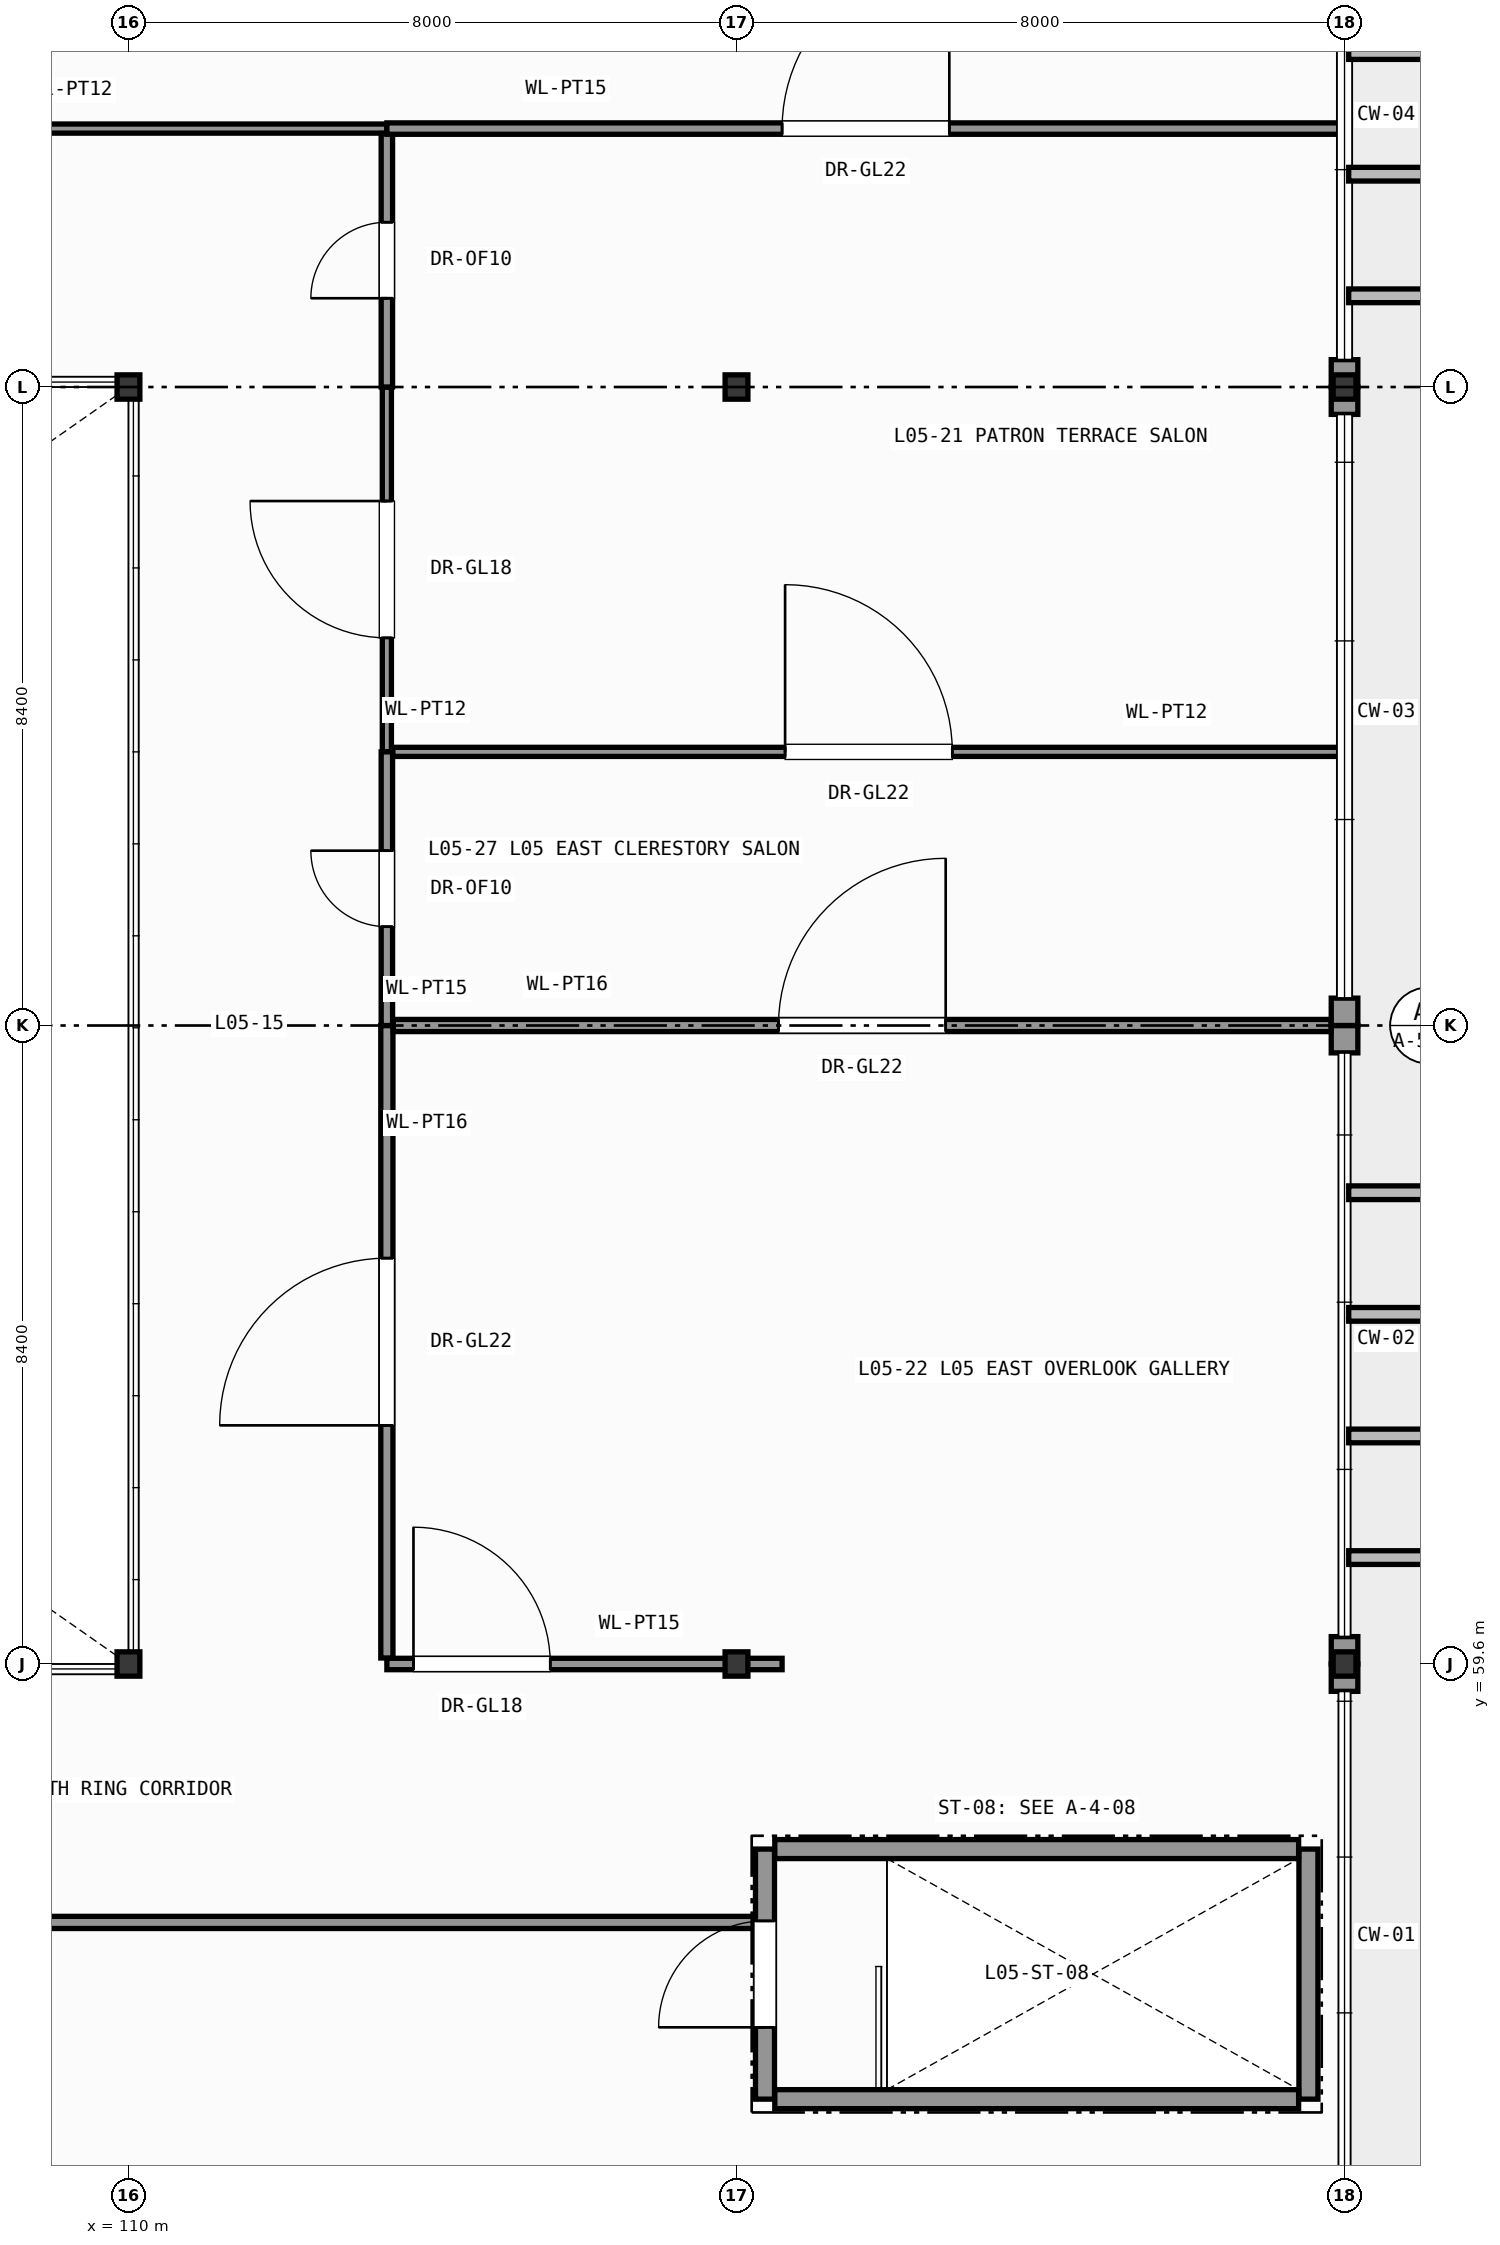
"""IFC4 building model, lengths in metres.
Left out: names, types, materials, properties, quantities, classifications, styles, units other than length and angle.
Written with IfcOpenShell. Run it as: python <this file> out.ifc"""

import sys

from ifc_helpers import new_model, si_unit, direction, frame, frame_2d, origin, origin_2d, place, context, subcontext, project, spatial, rectangle, i_section, extrude, element, fill, save


model = new_model("IFC4")
c1 = context("Model", 3, precision=1e-05, world=origin(), true_north=direction((0.0, 1.0)))
c2 = subcontext(c1, "Body", "Model", "MODEL_VIEW")
j1 = project(units=[si_unit("LENGTHUNIT", "METRE"), si_unit("PLANEANGLEUNIT", "RADIAN")], contexts=[c1])
p1 = place(None, origin())
s1 = spatial("IfcSite", under=j1, at=p1, CompositionType="ELEMENT")
p2 = place(p1, origin())
s2 = spatial("IfcBuilding", under=s1, at=p2, CompositionType="ELEMENT")
p3 = place(p2, frame((0.0, 0.0, 22.2)))
s3 = spatial("IfcBuildingStorey", under=s2, at=p3, CompositionType="ELEMENT", Elevation=22.2)
for number, where, z_axis, x_axis in (
    (1, (110.0, 59.6, 0.0), (0.0, 0.0, 1.0), (1.0, 0.0, 0.0)),
    (2, (110.0, 76.4, 0.0), (0.0, 0.0, 1.0), (1.0, 0.0, 0.0)),
    (3, (118.0, 59.6, 0.0), (0.0, 0.0, 1.0), (1.0, 0.0, 0.0)),
    (4, (118.0, 76.4, 0.0), (0.0, 0.0, 1.0), (1.0, 0.0, 0.0)),
    (5, (126.0, 59.6, 0.0), (0.0, 0.0, 1.0), (1.0, 0.0, 0.0)),
    (6, (126.0, 76.4, 0.0), (0.0, 0.0, 1.0), (1.0, 0.0, 0.0)),
):
    element("IfcColumn", number, at=place(p3, frame(where, z_axis=z_axis, x_axis=x_axis)), inside=s3, PredefinedType="COLUMN", context=c2, shape_type="SweptSolid", body=[
        extrude(i_section(OverallWidth=0.3, OverallDepth=0.32, WebThickness=0.011, FlangeThickness=0.021, FilletRadius=0.027, at=origin_2d()), origin(), (0.0, 0.0, 1.0), 4.2),
    ])
p4 = place(p3, frame((126.0, 59.24, 0.0), z_axis=(0.0, 0.0, 1.0), x_axis=(0.0, 1.0, 0.0)))
e7 = element("IfcWall", 7, at=p4, inside=s3, PredefinedType="SOLIDWALL", context=c2, shape_type="SweptSolid", body=[
    extrude(rectangle(XDim=0.36, YDim=0.35, at=frame_2d((0.18, 0.0))), origin(), (0.0, 0.0, 1.0), 3.98),
])
p5 = place(p3, frame((126.0, 59.6, 0.0), z_axis=(0.0, 0.0, 1.0), x_axis=(0.0, 1.0, 0.0)))
e8 = element("IfcWall", 8, at=p5, inside=s3, PredefinedType="SOLIDWALL", context=c2, shape_type="SweptSolid", body=[
    extrude(rectangle(XDim=0.36, YDim=0.35, at=frame_2d((0.18, 0.0))), origin(), (0.0, 0.0, 1.0), 3.98),
])
for number, where, z_axis, x_axis in (
    (9, (126.0, 67.64, 0.0), (0.0, 0.0, 1.0), (0.0, 1.0, 0.0)),
    (10, (126.0, 68.0, 0.0), (0.0, 0.0, 1.0), (0.0, 1.0, 0.0)),
):
    element("IfcWall", number, at=place(p3, frame(where, z_axis=z_axis, x_axis=x_axis)), inside=s3, PredefinedType="SOLIDWALL", context=c2, shape_type="SweptSolid", body=[
        extrude(rectangle(XDim=0.36, YDim=0.35, at=frame_2d((0.18, 0.0))), origin(), (0.0, 0.0, 1.0), 3.98),
    ])
p6 = place(p3, frame((126.0, 76.04, 0.0), z_axis=(0.0, 0.0, 1.0), x_axis=(0.0, 1.0, 0.0)))
e11 = element("IfcWall", 11, at=p6, inside=s3, PredefinedType="SOLIDWALL", context=c2, shape_type="SweptSolid", body=[
    extrude(rectangle(XDim=0.36, YDim=0.35, at=frame_2d((0.18, 0.0))), origin(), (0.0, 0.0, 1.0), 3.98),
])
p7 = place(p3, frame((126.0, 76.4, 0.0), z_axis=(0.0, 0.0, 1.0), x_axis=(0.0, 1.0, 0.0)))
e12 = element("IfcWall", 12, at=p7, inside=s3, PredefinedType="SOLIDWALL", context=c2, shape_type="SweptSolid", body=[
    extrude(rectangle(XDim=0.36, YDim=0.35, at=frame_2d((0.18, 0.0))), origin(), (0.0, 0.0, 1.0), 3.98),
])
p8 = place(p3, frame((118.375, 53.875, 0.0), z_axis=(0.0, 0.0, 1.0), x_axis=(0.0, 1.0, 0.0)))
e13 = element("IfcWall", 13, at=p8, inside=s3, PredefinedType="SHEAR", context=c2, shape_type="SweptSolid", body=[
    extrude(rectangle(XDim=3.29, YDim=0.25, at=frame_2d((1.645, 0.0))), origin(), (0.0, 0.0, 1.0), 3.98),
])
p9 = place(p8, frame((0.945, 0.0, 0.0)))
e14 = element("IfcOpeningElement", 14, at=p9, cuts=e13, PredefinedType="OPENING", context=c2, shape_type="SweptSolid", body=[
    extrude(rectangle(XDim=1.4, YDim=2.2, at=frame_2d((0.7, 1.1))), frame((0.0, 0.135, 0.0), z_axis=(0.0, -1.0, 0.0), x_axis=(1.0, 0.0, 0.0)), (0.0, 0.0, 1.0), 0.27),
])
p10 = place(p3, frame((125.525, 53.875, 0.0), z_axis=(0.0, 0.0, 1.0), x_axis=(0.0, 1.0, 0.0)))
e15 = element("IfcWall", 15, at=p10, inside=s3, PredefinedType="SHEAR", context=c2, shape_type="SweptSolid", body=[
    extrude(rectangle(XDim=3.29, YDim=0.25, at=frame_2d((1.645, 0.0))), origin(), (0.0, 0.0, 1.0), 3.98),
])
for number, where, z_axis, x_axis in (
    (16, (118.504, 53.875, 0.0), (0.0, 0.0, 1.0), (1.0, 0.0, 0.0)),
    (17, (118.504, 57.165, 0.0), (0.0, 0.0, 1.0), (1.0, 0.0, 0.0)),
):
    element("IfcWall", number, at=place(p3, frame(where, z_axis=z_axis, x_axis=x_axis)), inside=s3, PredefinedType="SHEAR", context=c2, shape_type="SweptSolid", body=[
        extrude(rectangle(XDim=6.892, YDim=0.25, at=frame_2d((3.446, 0.0))), origin(), (0.0, 0.0, 1.0), 3.98),
    ])
p11 = place(p3, frame((82.6, 56.2, 0.0), z_axis=(0.0, 0.0, 1.0), x_axis=(1.0, 0.0, 0.0)))
e18 = element("IfcWall", 18, at=p11, inside=s3, PredefinedType="PARTITIONING", context=c2, shape_type="SweptSolid", body=[
    extrude(rectangle(XDim=35.646, YDim=0.16, at=frame_2d((17.823, 0.0))), origin(), (0.0, 0.0, 1.0), 3.98),
])
p12 = place(p11, frame((16.723, 0.0, 0.0)))
e19 = element("IfcOpeningElement", 19, at=p12, cuts=e18, PredefinedType="OPENING", context=c2, shape_type="SweptSolid", body=[
    extrude(rectangle(XDim=2.2, YDim=2.6, at=frame_2d((1.1, 1.3))), frame((0.0, 0.09, 0.0), z_axis=(0.0, -1.0, 0.0), x_axis=(1.0, 0.0, 0.0)), (0.0, 0.0, 1.0), 0.18),
])
p13 = place(p3, frame((113.4, 59.6, 0.0), z_axis=(0.0, 0.0, 1.0), x_axis=(1.0, 0.0, 0.0)))
e20 = element("IfcWall", 20, at=p13, inside=s3, PredefinedType="PARTITIONING", context=c2, shape_type="SweptSolid", body=[
    extrude(rectangle(XDim=5.2, YDim=0.15, at=frame_2d((2.6, 0.0))), origin(), (0.0, 0.0, 1.0), 3.335),
])
p14 = place(p13, frame((0.35, 0.0, 0.0)))
e21 = element("IfcOpeningElement", 21, at=p14, cuts=e20, PredefinedType="OPENING", context=c2, shape_type="SweptSolid", body=[
    extrude(rectangle(XDim=1.8, YDim=2.4, at=frame_2d((0.9, 1.2))), frame((0.0, 0.085, 0.0), z_axis=(0.0, -1.0, 0.0), x_axis=(1.0, 0.0, 0.0)), (0.0, 0.0, 1.0), 0.17),
])
p15 = place(p3, frame((113.4, 71.6, 0.0), z_axis=(0.0, 0.0, 1.0), x_axis=(0.0, 1.0, 0.0)))
e22 = element("IfcWall", 22, at=p15, inside=s3, PredefinedType="PARTITIONING", context=c2, shape_type="SweptSolid", body=[
    extrude(rectangle(XDim=4.8, YDim=0.12, at=frame_2d((2.4, 0.0))), origin(), (0.0, 0.0, 1.0), 3.98),
])
p16 = place(p15, frame((1.5, 0.0, 0.0)))
e23 = element("IfcOpeningElement", 23, at=p16, cuts=e22, PredefinedType="OPENING", context=c2, shape_type="SweptSolid", body=[
    extrude(rectangle(XDim=1.8, YDim=2.4, at=frame_2d((0.9, 1.2))), frame((0.0, 0.07, 0.0), z_axis=(0.0, -1.0, 0.0), x_axis=(1.0, 0.0, 0.0)), (0.0, 0.0, 1.0), 0.14),
])
p17 = place(p3, frame((113.4, 59.679, 0.0), z_axis=(0.0, 0.0, 1.0), x_axis=(0.0, 1.0, 0.0)))
e24 = element("IfcWall", 24, at=p17, inside=s3, PredefinedType="PARTITIONING", context=c2, shape_type="SweptSolid", body=[
    extrude(rectangle(XDim=8.321, YDim=0.16, at=frame_2d((4.161, 0.0))), origin(), (0.0, 0.0, 1.0), 3.98),
])
p18 = place(p17, frame((3.061, 0.0, 0.0)))
e25 = element("IfcOpeningElement", 25, at=p18, cuts=e24, PredefinedType="OPENING", context=c2, shape_type="SweptSolid", body=[
    extrude(rectangle(XDim=2.2, YDim=2.6, at=frame_2d((1.1, 1.3))), frame((0.0, 0.09, 0.0), z_axis=(0.0, -1.0, 0.0), x_axis=(1.0, 0.0, 0.0)), (0.0, 0.0, 1.0), 0.18),
])
p19 = place(p3, frame((113.4, 68.0, 0.0), z_axis=(0.0, 0.0, 1.0), x_axis=(0.0, 1.0, 0.0)))
e26 = element("IfcWall", 26, at=p19, inside=s3, PredefinedType="PARTITIONING", context=c2, shape_type="SweptSolid", body=[
    extrude(rectangle(XDim=3.6, YDim=0.15, at=frame_2d((1.8, 0.0))), origin(), (0.0, 0.0, 1.0), 3.98),
])
p20 = place(p19, frame((1.3, 0.0, 0.0)))
e27 = element("IfcOpeningElement", 27, at=p20, cuts=e26, PredefinedType="OPENING", context=c2, shape_type="SweptSolid", body=[
    extrude(rectangle(XDim=1.0, YDim=2.15, at=frame_2d((0.5, 1.075))), frame((0.0, 0.085, 0.0), z_axis=(0.0, -1.0, 0.0), x_axis=(1.0, 0.0, 0.0)), (0.0, 0.0, 1.0), 0.17),
])
p21 = place(p3, frame((93.654, 79.8, 0.0), z_axis=(0.0, 0.0, 1.0), x_axis=(1.0, 0.0, 0.0)))
e28 = element("IfcWall", 28, at=p21, inside=s3, PredefinedType="PARTITIONING", context=c2, shape_type="SweptSolid", body=[
    extrude(rectangle(XDim=19.746, YDim=0.12, at=frame_2d((9.873, 0.0))), origin(), (0.0, 0.0, 1.0), 3.98),
])
p22 = place(p21, frame((8.773, 0.0, 0.0)))
e29 = element("IfcOpeningElement", 29, at=p22, cuts=e28, PredefinedType="OPENING", context=c2, shape_type="SweptSolid", body=[
    extrude(rectangle(XDim=2.2, YDim=2.6, at=frame_2d((1.1, 1.3))), frame((0.0, 0.07, 0.0), z_axis=(0.0, -1.0, 0.0), x_axis=(1.0, 0.0, 0.0)), (0.0, 0.0, 1.0), 0.14),
])
p23 = place(p3, frame((113.4, 76.4, 0.0), z_axis=(0.0, 0.0, 1.0), x_axis=(0.0, 1.0, 0.0)))
e30 = element("IfcWall", 30, at=p23, inside=s3, PredefinedType="PARTITIONING", context=c2, shape_type="SweptSolid", body=[
    extrude(rectangle(XDim=3.336, YDim=0.15, at=frame_2d((1.668, 0.0))), origin(), (0.0, 0.0, 1.0), 3.98),
])
p24 = place(p23, frame((1.168, 0.0, 0.0)))
e31 = element("IfcOpeningElement", 31, at=p24, cuts=e30, PredefinedType="OPENING", context=c2, shape_type="SweptSolid", body=[
    extrude(rectangle(XDim=1.0, YDim=2.15, at=frame_2d((0.5, 1.075))), frame((0.0, 0.085, 0.0), z_axis=(0.0, -1.0, 0.0), x_axis=(1.0, 0.0, 0.0)), (0.0, 0.0, 1.0), 0.17),
])
p25 = place(p3, frame((113.4, 79.8, 0.0), z_axis=(0.0, 0.0, 1.0), x_axis=(1.0, 0.0, 0.0)))
e32 = element("IfcWall", 32, at=p25, inside=s3, PredefinedType="PARTITIONING", context=c2, shape_type="SweptSolid", body=[
    extrude(rectangle(XDim=12.6, YDim=0.15, at=frame_2d((6.3, 0.0))), origin(), (0.0, 0.0, 1.0), 3.98),
])
p26 = place(p25, frame((5.2, 0.0, 0.0)))
e33 = element("IfcOpeningElement", 33, at=p26, cuts=e32, PredefinedType="OPENING", context=c2, shape_type="SweptSolid", body=[
    extrude(rectangle(XDim=2.2, YDim=2.6, at=frame_2d((1.1, 1.3))), frame((0.0, 0.085, 0.0), z_axis=(0.0, -1.0, 0.0), x_axis=(1.0, 0.0, 0.0)), (0.0, 0.0, 1.0), 0.17),
])
p27 = place(p3, frame((113.479, 71.6, 0.0), z_axis=(0.0, 0.0, 1.0), x_axis=(1.0, 0.0, 0.0)))
e34 = element("IfcWall", 34, at=p27, inside=s3, PredefinedType="PARTITIONING", context=c2, shape_type="SweptSolid", body=[
    extrude(rectangle(XDim=12.521, YDim=0.12, at=frame_2d((6.26, 0.0))), origin(), (0.0, 0.0, 1.0), 3.98),
])
p28 = place(p27, frame((5.16, 0.0, 0.0)))
e35 = element("IfcOpeningElement", 35, at=p28, cuts=e34, PredefinedType="OPENING", context=c2, shape_type="SweptSolid", body=[
    extrude(rectangle(XDim=2.2, YDim=2.6, at=frame_2d((1.1, 1.3))), frame((0.0, 0.07, 0.0), z_axis=(0.0, -1.0, 0.0), x_axis=(1.0, 0.0, 0.0)), (0.0, 0.0, 1.0), 0.14),
])
p29 = place(p3, frame((113.484, 68.0, 0.0), z_axis=(0.0, 0.0, 1.0), x_axis=(1.0, 0.0, 0.0)))
e36 = element("IfcWall", 36, at=p29, inside=s3, PredefinedType="PARTITIONING", context=c2, shape_type="SweptSolid", body=[
    extrude(rectangle(XDim=12.337, YDim=0.16, at=frame_2d((6.168, 0.0))), origin(), (0.0, 0.0, 1.0), 3.98),
])
p30 = place(p29, frame((5.069, 0.0, 0.0)))
e37 = element("IfcOpeningElement", 37, at=p30, cuts=e36, PredefinedType="OPENING", context=c2, shape_type="SweptSolid", body=[
    extrude(rectangle(XDim=2.2, YDim=2.6, at=frame_2d((1.1, 1.3))), frame((0.0, 0.09, 0.0), z_axis=(0.0, -1.0, 0.0), x_axis=(1.0, 0.0, 0.0)), (0.0, 0.0, 1.0), 0.18),
])
p31 = place(p9, origin())
e38 = element("IfcDoor", 38, at=p31, inside=s3, OperationType="SINGLE_SWING_LEFT", PredefinedType="DOOR", context=c2, shape_type="SweptSolid", body=[
    extrude(rectangle(XDim=1.4, YDim=2.2, at=frame_2d((0.7, 1.1))), frame((0.0, 0.025, 0.0), z_axis=(0.0, -1.0, 0.0), x_axis=(1.0, 0.0, 0.0)), (0.0, 0.0, 1.0), 0.05),
])
fill(e14, e38)
p32 = place(p14, origin())
e39 = element("IfcDoor", 39, at=p32, inside=s3, OperationType="SINGLE_SWING_LEFT", PredefinedType="DOOR", context=c2, shape_type="SweptSolid", body=[
    extrude(rectangle(XDim=1.8, YDim=2.4, at=frame_2d((0.9, 1.2))), frame((0.0, 0.025, 0.0), z_axis=(0.0, -1.0, 0.0), x_axis=(1.0, 0.0, 0.0)), (0.0, 0.0, 1.0), 0.05),
])
fill(e21, e39)
p33 = place(p16, origin())
e40 = element("IfcDoor", 40, at=p33, inside=s3, OperationType="SINGLE_SWING_RIGHT", PredefinedType="DOOR", context=c2, shape_type="SweptSolid", body=[
    extrude(rectangle(XDim=1.8, YDim=2.4, at=frame_2d((0.9, 1.2))), frame((0.0, 0.025, 0.0), z_axis=(0.0, -1.0, 0.0), x_axis=(1.0, 0.0, 0.0)), (0.0, 0.0, 1.0), 0.05),
])
fill(e23, e40)
p34 = place(p18, origin())
e41 = element("IfcDoor", 41, at=p34, inside=s3, OperationType="SINGLE_SWING_LEFT", PredefinedType="DOOR", context=c2, shape_type="SweptSolid", body=[
    extrude(rectangle(XDim=2.2, YDim=2.6, at=frame_2d((1.1, 1.3))), frame((0.0, 0.025, 0.0), z_axis=(0.0, -1.0, 0.0), x_axis=(1.0, 0.0, 0.0)), (0.0, 0.0, 1.0), 0.05),
])
fill(e25, e41)
p35 = place(p20, origin())
e42 = element("IfcDoor", 42, at=p35, inside=s3, OperationType="SINGLE_SWING_RIGHT", PredefinedType="DOOR", context=c2, shape_type="SweptSolid", body=[
    extrude(rectangle(XDim=1.0, YDim=2.15, at=frame_2d((0.5, 1.075))), frame((0.0, 0.025, 0.0), z_axis=(0.0, -1.0, 0.0), x_axis=(1.0, 0.0, 0.0)), (0.0, 0.0, 1.0), 0.05),
])
fill(e27, e42)
p36 = place(p24, origin())
e43 = element("IfcDoor", 43, at=p36, inside=s3, OperationType="SINGLE_SWING_LEFT", PredefinedType="DOOR", context=c2, shape_type="SweptSolid", body=[
    extrude(rectangle(XDim=1.0, YDim=2.15, at=frame_2d((0.5, 1.075))), frame((0.0, 0.025, 0.0), z_axis=(0.0, -1.0, 0.0), x_axis=(1.0, 0.0, 0.0)), (0.0, 0.0, 1.0), 0.05),
])
fill(e31, e43)
p37 = place(p26, origin())
e44 = element("IfcDoor", 44, at=p37, inside=s3, OperationType="SINGLE_SWING_RIGHT", PredefinedType="DOOR", context=c2, shape_type="SweptSolid", body=[
    extrude(rectangle(XDim=2.2, YDim=2.6, at=frame_2d((1.1, 1.3))), frame((0.0, 0.025, 0.0), z_axis=(0.0, -1.0, 0.0), x_axis=(1.0, 0.0, 0.0)), (0.0, 0.0, 1.0), 0.05),
])
fill(e33, e44)
p38 = place(p28, origin())
e45 = element("IfcDoor", 45, at=p38, inside=s3, OperationType="SINGLE_SWING_LEFT", PredefinedType="DOOR", context=c2, shape_type="SweptSolid", body=[
    extrude(rectangle(XDim=2.2, YDim=2.6, at=frame_2d((1.1, 1.3))), frame((0.0, 0.025, 0.0), z_axis=(0.0, -1.0, 0.0), x_axis=(1.0, 0.0, 0.0)), (0.0, 0.0, 1.0), 0.05),
])
fill(e35, e45)
p39 = place(p30, origin())
e46 = element("IfcDoor", 46, at=p39, inside=s3, OperationType="SINGLE_SWING_RIGHT", PredefinedType="DOOR", context=c2, shape_type="SweptSolid", body=[
    extrude(rectangle(XDim=2.2, YDim=2.6, at=frame_2d((1.1, 1.3))), frame((0.0, 0.025, 0.0), z_axis=(0.0, -1.0, 0.0), x_axis=(1.0, 0.0, 0.0)), (0.0, 0.0, 1.0), 0.05),
])
fill(e37, e46)
save(model, sys.argv[1])
